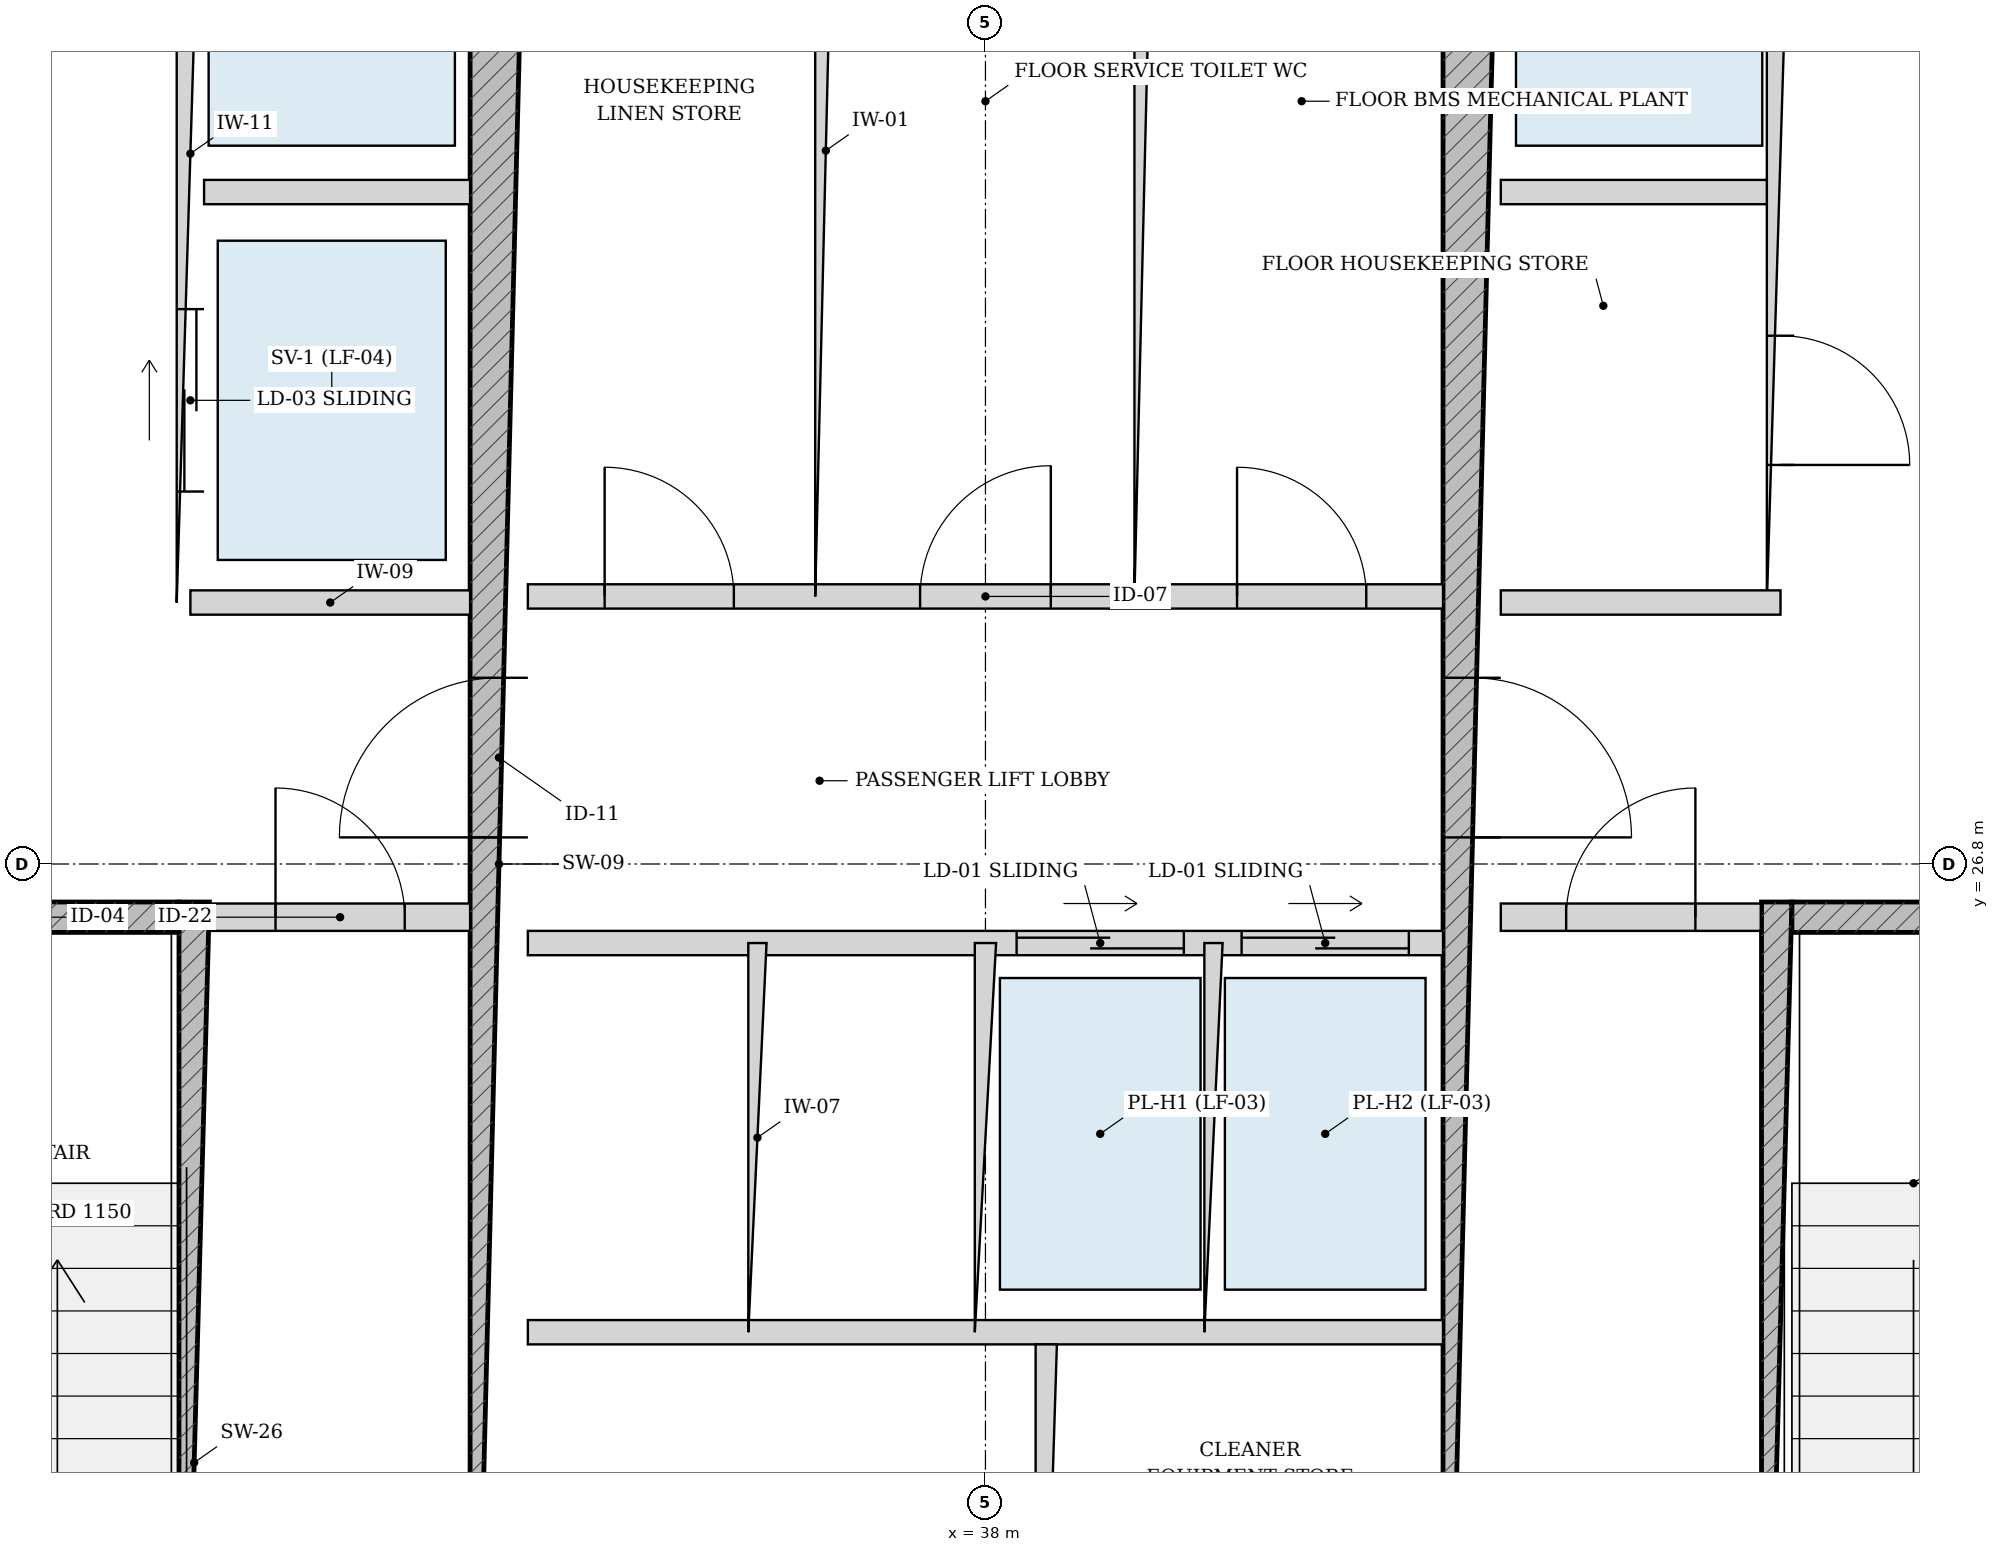
"""IFC4 building model, lengths in metres.
Left out: names, types, materials, properties, quantities, classifications, styles, units other than length and angle.
Written with IfcOpenShell. Run it as: python <this file> out.ifc"""

import sys

from ifc_helpers import new_model, si_unit, direction, frame, frame_2d, origin, place, context, subcontext, project, spatial, rectangle, extrude, source, transform, mapped, element, fill, save


model = new_model("IFC4")
c1 = context("Model", 3, precision=1e-05, world=origin(), true_north=direction((-0.2419218956, 0.970295726276)))
c2 = subcontext(c1, "Body", "Model", "MODEL_VIEW")
j1 = project(units=[si_unit("LENGTHUNIT", "METRE"), si_unit("PLANEANGLEUNIT", "RADIAN")], contexts=[c1])
p1 = place(None, origin())
s1 = spatial("IfcSite", under=j1, at=p1, CompositionType="ELEMENT")
p2 = place(p1, origin())
s2 = spatial("IfcBuilding", under=s1, at=p2, CompositionType="ELEMENT")
p3 = place(p2, frame((0.0, 0.0, 248.2)))
s3 = spatial("IfcBuildingStorey", under=s2, at=p3, CompositionType="ELEMENT", Elevation=248.2)
p4 = place(p3, frame((32.795, 19.175, 0.0), z_axis=(0.0, 0.0, 1.0), x_axis=(0.0, 1.0, 0.0)))
e1 = element("IfcWall", 1, at=p4, inside=s3, PredefinedType="SOLIDWALL", context=c2, shape_type="SweptSolid", body=[
    extrude(rectangle(XDim=7.375, YDim=0.2, at=frame_2d((3.688, 0.0))), origin(), (0.0, 0.0, 1.0), 3.49),
])
p5 = place(p3, frame((29.375, 26.45, 0.0), z_axis=(0.0, 0.0, 1.0), x_axis=(1.0, 0.0, 0.0)))
e2 = element("IfcWall", 2, at=p5, inside=s3, PredefinedType="SOLIDWALL", context=c2, shape_type="SweptSolid", body=[
    extrude(rectangle(XDim=3.32, YDim=0.2, at=frame_2d((1.66, 0.0))), origin(), (0.0, 0.0, 1.0), 3.49),
])
p6 = place(p5, frame((1.185, 0.0, 0.0)))
e3 = element("IfcOpeningElement", 3, at=p6, cuts=e2, PredefinedType="OPENING", context=c2, shape_type="SweptSolid", body=[
    extrude(rectangle(XDim=0.95, YDim=2.15, at=frame_2d((0.475, 1.075))), frame((0.0, 0.11, 0.0), z_axis=(0.0, -1.0, 0.0), x_axis=(1.0, 0.0, 0.0)), (0.0, 0.0, 1.0), 0.22),
])
p7 = place(p3, frame((43.205, 19.175, 0.0), z_axis=(0.0, 0.0, 1.0), x_axis=(0.0, 1.0, 0.0)))
e4 = element("IfcWall", 4, at=p7, inside=s3, PredefinedType="SOLIDWALL", context=c2, shape_type="SweptSolid", body=[
    extrude(rectangle(XDim=7.375, YDim=0.2, at=frame_2d((3.688, 0.0))), origin(), (0.0, 0.0, 1.0), 3.49),
])
p8 = place(p3, frame((43.305, 26.45, 0.0), z_axis=(0.0, 0.0, 1.0), x_axis=(1.0, 0.0, 0.0)))
e5 = element("IfcWall", 5, at=p8, inside=s3, PredefinedType="SOLIDWALL", context=c2, shape_type="SweptSolid", body=[
    extrude(rectangle(XDim=3.32, YDim=0.2, at=frame_2d((1.66, 0.0))), origin(), (0.0, 0.0, 1.0), 3.49),
])
p9 = place(p8, frame((1.185, 0.0, 0.0)))
e6 = element("IfcOpeningElement", 6, at=p9, cuts=e5, PredefinedType="OPENING", context=c2, shape_type="SweptSolid", body=[
    extrude(rectangle(XDim=0.95, YDim=2.15, at=frame_2d((0.475, 1.075))), frame((0.0, 0.11, 0.0), z_axis=(0.0, -1.0, 0.0), x_axis=(1.0, 0.0, 0.0)), (0.0, 0.0, 1.0), 0.22),
])
p10 = place(p3, frame((34.8, 19.175, 0.0), z_axis=(0.0, 0.0, 1.0), x_axis=(0.0, 1.0, 0.0)))
e7 = element("IfcWall", 7, at=p10, inside=s3, PredefinedType="SHEAR", context=c2, shape_type="SweptSolid", body=[
    extrude(rectangle(XDim=15.25, YDim=0.38, at=frame_2d((7.625, 0.0))), origin(), (0.0, 0.0, 1.0), 3.49),
])
p11 = place(p10, frame((7.8, 0.0, 0.0)))
e8 = element("IfcOpeningElement", 8, at=p11, cuts=e7, PredefinedType="OPENING", context=c2, shape_type="SweptSolid", body=[
    extrude(rectangle(XDim=1.05, YDim=2.15, at=frame_2d((0.525, 1.075))), frame((0.0, 0.2, 0.0), z_axis=(0.0, -1.0, 0.0), x_axis=(1.0, 0.0, 0.0)), (0.0, 0.0, 1.0), 0.4),
])
p12 = place(p3, frame((41.2, 19.175, 0.0), z_axis=(0.0, 0.0, 1.0), x_axis=(0.0, 1.0, 0.0)))
e9 = element("IfcWall", 9, at=p12, inside=s3, PredefinedType="SHEAR", context=c2, shape_type="SweptSolid", body=[
    extrude(rectangle(XDim=15.25, YDim=0.38, at=frame_2d((7.625, 0.0))), origin(), (0.0, 0.0, 1.0), 3.49),
])
p13 = place(p12, frame((7.8, 0.0, 0.0)))
e10 = element("IfcOpeningElement", 10, at=p13, cuts=e9, PredefinedType="OPENING", context=c2, shape_type="SweptSolid", body=[
    extrude(rectangle(XDim=1.05, YDim=2.15, at=frame_2d((0.525, 1.075))), frame((0.0, 0.2, 0.0), z_axis=(0.0, -1.0, 0.0), x_axis=(1.0, 0.0, 0.0)), (0.0, 0.0, 1.0), 0.4),
])
p14 = place(p3, frame((32.9, 26.45, 0.0), z_axis=(0.0, 0.0, 1.0), x_axis=(1.0, 0.0, 0.0)))
e11 = element("IfcWall", 11, at=p14, inside=s3, PredefinedType="PARTITIONING", context=c2, shape_type="SweptSolid", body=[
    extrude(rectangle(XDim=1.71, YDim=0.18, at=frame_2d((0.855, 0.0))), origin(), (0.0, 0.0, 1.0), 3.49),
])
p15 = place(p14, frame((0.43, 0.0, 0.0)))
e12 = element("IfcOpeningElement", 12, at=p15, cuts=e11, PredefinedType="OPENING", context=c2, shape_type="SweptSolid", body=[
    extrude(rectangle(XDim=0.85, YDim=2.1, at=frame_2d((0.425, 1.05))), frame((0.0, 0.1, 0.0), z_axis=(0.0, -1.0, 0.0), x_axis=(1.0, 0.0, 0.0)), (0.0, 0.0, 1.0), 0.2),
])
p16 = place(p3, frame((41.39, 26.45, 0.0), z_axis=(0.0, 0.0, 1.0), x_axis=(1.0, 0.0, 0.0)))
e13 = element("IfcWall", 13, at=p16, inside=s3, PredefinedType="PARTITIONING", context=c2, shape_type="SweptSolid", body=[
    extrude(rectangle(XDim=1.71, YDim=0.18, at=frame_2d((0.855, 0.0))), origin(), (0.0, 0.0, 1.0), 3.49),
])
p17 = place(p16, frame((0.43, 0.0, 0.0)))
e14 = element("IfcOpeningElement", 14, at=p17, cuts=e13, PredefinedType="OPENING", context=c2, shape_type="SweptSolid", body=[
    extrude(rectangle(XDim=0.85, YDim=2.1, at=frame_2d((0.425, 1.05))), frame((0.0, 0.1, 0.0), z_axis=(0.0, -1.0, 0.0), x_axis=(1.0, 0.0, 0.0)), (0.0, 0.0, 1.0), 0.2),
])
p18 = place(p3, frame((32.77, 28.52, 0.0), z_axis=(0.0, 0.0, 1.0), x_axis=(0.0, 1.0, 0.0)))
e15 = element("IfcWall", 15, at=p18, inside=s3, PredefinedType="PARTITIONING", context=c2, shape_type="SweptSolid", body=[
    extrude(rectangle(XDim=5.905, YDim=0.18, at=frame_2d((2.953, 0.0))), origin(), (0.0, 0.0, 1.0), 3.49),
])
p19 = place(p18, frame((3.655, 0.0, 0.0)))
e16 = element("IfcOpeningElement", 16, at=p19, cuts=e15, PredefinedType="OPENING", context=c2, shape_type="SweptSolid", body=[
    extrude(rectangle(XDim=1.15, YDim=2.2, at=frame_2d((0.575, 1.1))), frame((0.0, 0.1, 0.0), z_axis=(0.0, -1.0, 0.0), x_axis=(1.0, 0.0, 0.0)), (0.0, 0.0, 1.0), 0.2),
])
p20 = place(p18, frame((0.73, 0.0, 0.0)))
e17 = element("IfcOpeningElement", 17, at=p20, cuts=e15, PredefinedType="OPENING", context=c2, shape_type="SweptSolid", body=[
    extrude(rectangle(XDim=1.2, YDim=2.25, at=frame_2d((0.6, 1.125))), frame((0.0, 0.1, 0.0), z_axis=(0.0, -1.0, 0.0), x_axis=(1.0, 0.0, 0.0)), (0.0, 0.0, 1.0), 0.2),
])
p21 = place(p3, frame((32.86, 31.22, 0.0), z_axis=(0.0, 0.0, 1.0), x_axis=(1.0, 0.0, 0.0)))
e18 = element("IfcWall", 18, at=p21, inside=s3, PredefinedType="PARTITIONING", context=c2, shape_type="SweptSolid", body=[
    extrude(rectangle(XDim=1.75, YDim=0.16, at=frame_2d((0.875, 0.0))), origin(), (0.0, 0.0, 1.0), 3.49),
])
p22 = place(p3, frame((32.77, 28.52, 0.0), z_axis=(0.0, 0.0, 1.0), x_axis=(1.0, 0.0, 0.0)))
e19 = element("IfcWall", 19, at=p22, inside=s3, PredefinedType="PARTITIONING", context=c2, shape_type="SweptSolid", body=[
    extrude(rectangle(XDim=1.84, YDim=0.16, at=frame_2d((0.92, 0.0))), origin(), (0.0, 0.0, 1.0), 3.49),
])
p23 = place(p3, frame((43.23, 28.52, 0.0), z_axis=(0.0, 0.0, 1.0), x_axis=(0.0, 1.0, 0.0)))
e20 = element("IfcWall", 20, at=p23, inside=s3, PredefinedType="PARTITIONING", context=c2, shape_type="SweptSolid", body=[
    extrude(rectangle(XDim=5.905, YDim=0.18, at=frame_2d((2.953, 0.0))), origin(), (0.0, 0.0, 1.0), 3.49),
])
p24 = place(p23, frame((0.905, 0.0, 0.0)))
e21 = element("IfcOpeningElement", 21, at=p24, cuts=e20, PredefinedType="OPENING", context=c2, shape_type="SweptSolid", body=[
    extrude(rectangle(XDim=0.85, YDim=2.1, at=frame_2d((0.425, 1.05))), frame((0.0, 0.1, 0.0), z_axis=(0.0, -1.0, 0.0), x_axis=(1.0, 0.0, 0.0)), (0.0, 0.0, 1.0), 0.2),
])
p25 = place(p23, frame((3.655, 0.0, 0.0)))
e22 = element("IfcOpeningElement", 22, at=p25, cuts=e20, PredefinedType="OPENING", context=c2, shape_type="SweptSolid", body=[
    extrude(rectangle(XDim=1.15, YDim=2.2, at=frame_2d((0.575, 1.1))), frame((0.0, 0.1, 0.0), z_axis=(0.0, -1.0, 0.0), x_axis=(1.0, 0.0, 0.0)), (0.0, 0.0, 1.0), 0.2),
])
p26 = place(p3, frame((41.39, 31.22, 0.0), z_axis=(0.0, 0.0, 1.0), x_axis=(1.0, 0.0, 0.0)))
e23 = element("IfcWall", 23, at=p26, inside=s3, PredefinedType="PARTITIONING", context=c2, shape_type="SweptSolid", body=[
    extrude(rectangle(XDim=1.75, YDim=0.16, at=frame_2d((0.875, 0.0))), origin(), (0.0, 0.0, 1.0), 3.49),
])
p27 = place(p3, frame((41.39, 28.52, 0.0), z_axis=(0.0, 0.0, 1.0), x_axis=(1.0, 0.0, 0.0)))
e24 = element("IfcWall", 24, at=p27, inside=s3, PredefinedType="PARTITIONING", context=c2, shape_type="SweptSolid", body=[
    extrude(rectangle(XDim=1.84, YDim=0.16, at=frame_2d((0.92, 0.0))), origin(), (0.0, 0.0, 1.0), 3.49),
])
p28 = place(p3, frame((34.99, 28.56, 0.0), z_axis=(0.0, 0.0, 1.0), x_axis=(1.0, 0.0, 0.0)))
e25 = element("IfcWall", 25, at=p28, inside=s3, PredefinedType="PARTITIONING", context=c2, shape_type="SweptSolid", body=[
    extrude(rectangle(XDim=6.02, YDim=0.16, at=frame_2d((3.01, 0.0))), origin(), (0.0, 0.0, 1.0), 3.49),
])
p29 = place(p28, frame((0.505, 0.0, 0.0)))
e26 = element("IfcOpeningElement", 26, at=p29, cuts=e25, PredefinedType="OPENING", context=c2, shape_type="SweptSolid", body=[
    extrude(rectangle(XDim=0.85, YDim=2.1, at=frame_2d((0.425, 1.05))), frame((0.0, 0.09, 0.0), z_axis=(0.0, -1.0, 0.0), x_axis=(1.0, 0.0, 0.0)), (0.0, 0.0, 1.0), 0.18),
])
p30 = place(p28, frame((2.58, 0.0, 0.0)))
e27 = element("IfcOpeningElement", 27, at=p30, cuts=e25, PredefinedType="OPENING", context=c2, shape_type="SweptSolid", body=[
    extrude(rectangle(XDim=0.86, YDim=2.1, at=frame_2d((0.43, 1.05))), frame((0.0, 0.09, 0.0), z_axis=(0.0, -1.0, 0.0), x_axis=(1.0, 0.0, 0.0)), (0.0, 0.0, 1.0), 0.18),
])
p31 = place(p28, frame((4.665, 0.0, 0.0)))
e28 = element("IfcOpeningElement", 28, at=p31, cuts=e25, PredefinedType="OPENING", context=c2, shape_type="SweptSolid", body=[
    extrude(rectangle(XDim=0.85, YDim=2.1, at=frame_2d((0.425, 1.05))), frame((0.0, 0.09, 0.0), z_axis=(0.0, -1.0, 0.0), x_axis=(1.0, 0.0, 0.0)), (0.0, 0.0, 1.0), 0.18),
])
for number, where, z_axis, x_axis in (
    (29, (36.95, 28.56, 0.0), (0.0, 0.0, 1.0), (0.0, 1.0, 0.0)),
    (30, (39.05, 28.56, 0.0), (0.0, 0.0, 1.0), (0.0, 1.0, 0.0)),
):
    element("IfcWall", number, at=place(p3, frame(where, z_axis=z_axis, x_axis=x_axis)), inside=s3, PredefinedType="PARTITIONING", context=c2, shape_type="SweptSolid", body=[
        extrude(rectangle(XDim=5.865, YDim=0.14, at=frame_2d((2.933, 0.0))), origin(), (0.0, 0.0, 1.0), 3.49),
    ])
p32 = place(p3, frame((34.99, 26.28, 0.0), z_axis=(0.0, 0.0, 1.0), x_axis=(1.0, 0.0, 0.0)))
e31 = element("IfcWall", 31, at=p32, inside=s3, PredefinedType="PARTITIONING", context=c2, shape_type="SweptSolid", body=[
    extrude(rectangle(XDim=6.02, YDim=0.16, at=frame_2d((3.01, 0.0))), origin(), (0.0, 0.0, 1.0), 3.49),
])
p33 = place(p32, frame((3.215, 0.0, 0.0)))
e32 = element("IfcOpeningElement", 32, at=p33, cuts=e31, PredefinedType="OPENING", context=c2, shape_type="SweptSolid", body=[
    extrude(rectangle(XDim=1.1, YDim=2.2, at=frame_2d((0.55, 1.1))), frame((0.0, 0.09, 0.0), z_axis=(0.0, -1.0, 0.0), x_axis=(1.0, 0.0, 0.0)), (0.0, 0.0, 1.0), 0.18),
])
p34 = place(p32, frame((4.695, 0.0, 0.0)))
e33 = element("IfcOpeningElement", 33, at=p34, cuts=e31, PredefinedType="OPENING", context=c2, shape_type="SweptSolid", body=[
    extrude(rectangle(XDim=1.1, YDim=2.2, at=frame_2d((0.55, 1.1))), frame((0.0, 0.09, 0.0), z_axis=(0.0, -1.0, 0.0), x_axis=(1.0, 0.0, 0.0)), (0.0, 0.0, 1.0), 0.18),
])
p35 = place(p3, frame((34.99, 23.72, 0.0), z_axis=(0.0, 0.0, 1.0), x_axis=(1.0, 0.0, 0.0)))
e34 = element("IfcWall", 34, at=p35, inside=s3, PredefinedType="PARTITIONING", context=c2, shape_type="SweptSolid", body=[
    extrude(rectangle(XDim=6.02, YDim=0.16, at=frame_2d((3.01, 0.0))), origin(), (0.0, 0.0, 1.0), 3.49),
])
p36 = place(p3, frame((36.5, 23.72, 0.0), z_axis=(0.0, 0.0, 1.0), x_axis=(0.0, 1.0, 0.0)))
e35 = element("IfcWall", 35, at=p36, inside=s3, PredefinedType="PARTITIONING", context=c2, shape_type="SweptSolid", body=[
    extrude(rectangle(XDim=2.56, YDim=0.12, at=frame_2d((1.28, 0.0))), origin(), (0.0, 0.0, 1.0), 3.49),
])
p37 = place(p3, frame((38.0, 23.72, 0.0), z_axis=(0.0, 0.0, 1.0), x_axis=(0.0, 1.0, 0.0)))
e36 = element("IfcWall", 36, at=p37, inside=s3, PredefinedType="PARTITIONING", context=c2, shape_type="SweptSolid", body=[
    extrude(rectangle(XDim=2.56, YDim=0.14, at=frame_2d((1.28, 0.0))), origin(), (0.0, 0.0, 1.0), 3.49),
])
p38 = place(p3, frame((39.5, 23.72, 0.0), z_axis=(0.0, 0.0, 1.0), x_axis=(0.0, 1.0, 0.0)))
e37 = element("IfcWall", 37, at=p38, inside=s3, PredefinedType="PARTITIONING", context=c2, shape_type="SweptSolid", body=[
    extrude(rectangle(XDim=2.56, YDim=0.12, at=frame_2d((1.28, 0.0))), origin(), (0.0, 0.0, 1.0), 3.49),
])
p39 = place(p3, frame((38.4, 19.175, 0.0), z_axis=(0.0, 0.0, 1.0), x_axis=(0.0, 1.0, 0.0)))
e38 = element("IfcWall", 38, at=p39, inside=s3, PredefinedType="PARTITIONING", context=c2, shape_type="SweptSolid", body=[
    extrude(rectangle(XDim=4.465, YDim=0.14, at=frame_2d((2.232, 0.0))), origin(), (0.0, 0.0, 1.0), 3.49),
])
m1 = source(origin(), c2, "Body", "SweptSolid", [
    extrude(rectangle(XDim=1.05, YDim=2.15, at=frame_2d((0.525, 1.075))), frame((0.0, 0.025, 0.0), z_axis=(0.0, -1.0, 0.0), x_axis=(1.0, 0.0, 0.0)), (0.0, 0.0, 1.0), 0.05),
])
p40 = place(p11, origin())
e39 = element("IfcDoor", 39, at=p40, inside=s3, OperationType="SINGLE_SWING_LEFT", PredefinedType="DOOR", context=c2, shape_type="MappedRepresentation", body=[
    mapped(m1, transform((0.0, 0.0, 0.0), scale=1.0)),
])
fill(e8, e39)
p41 = place(p13, frame((1.05, 0.0, 0.0), z_axis=(0.0, 0.0, 1.0), x_axis=(-1.0, 0.0, 0.0)))
e40 = element("IfcDoor", 40, at=p41, inside=s3, OperationType="SINGLE_SWING_RIGHT", PredefinedType="DOOR", context=c2, shape_type="MappedRepresentation", body=[
    mapped(m1, transform((0.0, 0.0, 0.0), scale=1.0)),
])
fill(e10, e40)
m2 = source(origin(), c2, "Body", "SweptSolid", [
    extrude(rectangle(XDim=0.85, YDim=2.1, at=frame_2d((0.425, 1.05))), frame((0.0, 0.025, 0.0), z_axis=(0.0, -1.0, 0.0), x_axis=(1.0, 0.0, 0.0)), (0.0, 0.0, 1.0), 0.05),
])
p42 = place(p15, origin())
e41 = element("IfcDoor", 41, at=p42, inside=s3, OperationType="SINGLE_SWING_LEFT", PredefinedType="DOOR", context=c2, shape_type="MappedRepresentation", body=[
    mapped(m2, transform((0.0, 0.0, 0.0), scale=1.0)),
])
fill(e12, e41)
p43 = place(p17, origin())
e42 = element("IfcDoor", 42, at=p43, inside=s3, OperationType="SINGLE_SWING_RIGHT", PredefinedType="DOOR", context=c2, shape_type="MappedRepresentation", body=[
    mapped(m2, transform((0.0, 0.0, 0.0), scale=1.0)),
])
fill(e14, e42)
p44 = place(p24, frame((0.85, 0.0, 0.0), z_axis=(0.0, 0.0, 1.0), x_axis=(-1.0, 0.0, 0.0)))
e43 = element("IfcDoor", 43, at=p44, inside=s3, OperationType="SINGLE_SWING_RIGHT", PredefinedType="DOOR", context=c2, shape_type="MappedRepresentation", body=[
    mapped(m2, transform((0.0, 0.0, 0.0), scale=1.0)),
])
fill(e21, e43)
p45 = place(p29, origin())
e44 = element("IfcDoor", 44, at=p45, inside=s3, OperationType="SINGLE_SWING_LEFT", PredefinedType="DOOR", context=c2, shape_type="MappedRepresentation", body=[
    mapped(m2, transform((0.0, 0.0, 0.0), scale=1.0)),
])
fill(e26, e44)
m3 = source(origin(), c2, "Body", "SweptSolid", [
    extrude(rectangle(XDim=0.86, YDim=2.1, at=frame_2d((0.43, 1.05))), frame((0.0, 0.025, 0.0), z_axis=(0.0, -1.0, 0.0), x_axis=(1.0, 0.0, 0.0)), (0.0, 0.0, 1.0), 0.05),
])
p46 = place(p30, origin())
e45 = element("IfcDoor", 45, at=p46, inside=s3, OperationType="SINGLE_SWING_RIGHT", PredefinedType="DOOR", context=c2, shape_type="MappedRepresentation", body=[
    mapped(m3, transform((0.0, 0.0, 0.0), scale=1.0)),
])
fill(e27, e45)
p47 = place(p31, origin())
e46 = element("IfcDoor", 46, at=p47, inside=s3, OperationType="SINGLE_SWING_LEFT", PredefinedType="DOOR", context=c2, shape_type="MappedRepresentation", body=[
    mapped(m2, transform((0.0, 0.0, 0.0), scale=1.0)),
])
fill(e28, e46)
m4 = source(origin(), c2, "Body", "SweptSolid", [
    extrude(rectangle(XDim=1.2, YDim=2.25, at=frame_2d((0.6, 1.125))), frame((0.0, 0.025, 0.0), z_axis=(0.0, -1.0, 0.0), x_axis=(1.0, 0.0, 0.0)), (0.0, 0.0, 1.0), 0.05),
])
p48 = place(p20, origin())
e47 = element("IfcDoor", 47, at=p48, inside=s3, OperationType="DOUBLE_DOOR_SLIDING", PredefinedType="DOOR", context=c2, shape_type="MappedRepresentation", body=[
    mapped(m4, transform((0.0, 0.0, 0.0), scale=1.0)),
])
fill(e17, e47)
m5 = source(origin(), c2, "Body", "SweptSolid", [
    extrude(rectangle(XDim=1.1, YDim=2.2, at=frame_2d((0.55, 1.1))), frame((0.0, 0.025, 0.0), z_axis=(0.0, -1.0, 0.0), x_axis=(1.0, 0.0, 0.0)), (0.0, 0.0, 1.0), 0.05),
])
p49 = place(p33, origin())
e48 = element("IfcDoor", 48, at=p49, inside=s3, OperationType="DOUBLE_DOOR_SLIDING", PredefinedType="DOOR", context=c2, shape_type="MappedRepresentation", body=[
    mapped(m5, transform((0.0, 0.0, 0.0), scale=1.0)),
])
fill(e32, e48)
p50 = place(p34, origin())
e49 = element("IfcDoor", 49, at=p50, inside=s3, OperationType="DOUBLE_DOOR_SLIDING", PredefinedType="DOOR", context=c2, shape_type="MappedRepresentation", body=[
    mapped(m5, transform((0.0, 0.0, 0.0), scale=1.0)),
])
fill(e33, e49)
save(model, sys.argv[1])
